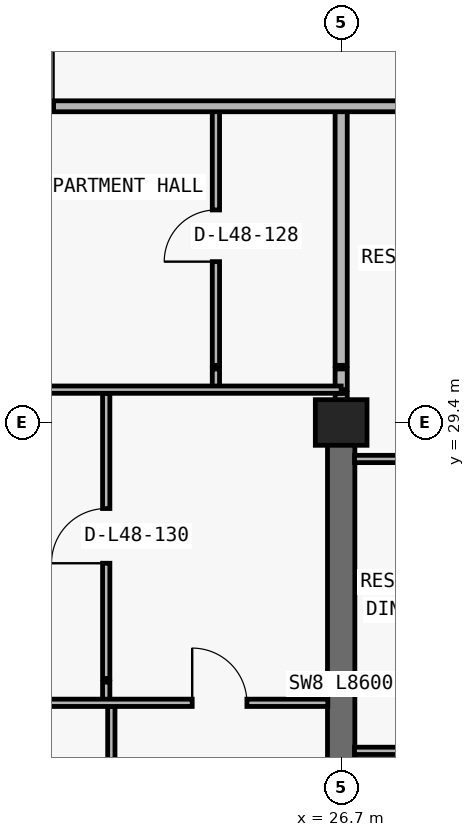
"""IFC4 building model, lengths in metres.
Left out: names, types, materials, properties, quantities, classifications, styles, units other than length and angle.
Written with IfcOpenShell. Run it as: python <this file> out.ifc"""

import sys

from ifc_helpers import new_model, si_unit, direction, frame, frame_2d, origin, origin_2d, place, context, subcontext, project, spatial, rectangle, extrude, element, fill, save


model = new_model("IFC4")
c1 = context("Model", 3, precision=1e-05, world=origin(), true_north=direction((0.0, 1.0)))
c2 = subcontext(c1, "Body", "Model", "MODEL_VIEW")
j1 = project(units=[si_unit("LENGTHUNIT", "METRE"), si_unit("PLANEANGLEUNIT", "RADIAN")], contexts=[c1])
p1 = place(None, origin())
s1 = spatial("IfcSite", under=j1, at=p1, CompositionType="ELEMENT")
p2 = place(p1, origin())
s2 = spatial("IfcBuilding", under=s1, at=p2, CompositionType="ELEMENT")
p3 = place(p2, frame((0.0, 0.0, 173.7)))
s3 = spatial("IfcBuildingStorey", under=s2, at=p3, CompositionType="ELEMENT", Elevation=173.7)
p4 = place(p3, frame((26.7, 29.4, 0.0), z_axis=(0.0, 0.0, 1.0), x_axis=(1.0, 0.0, 0.0)))
e1 = element("IfcColumn", 1, at=p4, inside=s3, PredefinedType="COLUMN", context=c2, shape_type="SweptSolid", body=[
    extrude(rectangle(XDim=0.85, YDim=0.75, at=origin_2d()), origin(), (0.0, 0.0, 1.0), 3.05),
])
p5 = place(p3, frame((26.7, 20.8, 0.0), z_axis=(0.0, 0.0, 1.0), x_axis=(0.0, 1.0, 0.0)))
e2 = element("IfcWall", 2, at=p5, inside=s3, PredefinedType="SHEAR", context=c2, shape_type="SweptSolid", body=[
    extrude(rectangle(XDim=8.6, YDim=0.45, at=frame_2d((4.3, 0.0))), origin(), (0.0, 0.0, 1.0), 3.05),
])
p6 = place(p3, frame((22.836, 24.79, 0.0), z_axis=(0.0, 0.0, 1.0), x_axis=(0.0, 1.0, 0.0)))
e3 = element("IfcWall", 3, at=p6, inside=s3, PredefinedType="PARTITIONING", context=c2, shape_type="SweptSolid", body=[
    extrude(rectangle(XDim=0.34, YDim=0.12, at=frame_2d((0.17, 0.0))), origin(), (0.0, 0.0, 1.0), 3.05),
])
p7 = place(p3, frame((22.836, 25.19, 0.0), z_axis=(0.0, 0.0, 1.0), x_axis=(0.0, 1.0, 0.0)))
e4 = element("IfcWall", 4, at=p7, inside=s3, PredefinedType="PARTITIONING", context=c2, shape_type="SweptSolid", body=[
    extrude(rectangle(XDim=4.69, YDim=0.12, at=frame_2d((2.345, 0.0))), origin(), (0.0, 0.0, 1.0), 3.05),
])
p8 = place(p7, frame((1.895, 0.0, 0.0)))
e5 = element("IfcOpeningElement", 5, at=p8, cuts=e4, PredefinedType="OPENING", context=c2, shape_type="SweptSolid", body=[
    extrude(rectangle(XDim=0.9, YDim=2.15, at=frame_2d((0.45, 1.075))), frame((0.0, 0.07, 0.0), z_axis=(0.0, -1.0, 0.0), x_axis=(1.0, 0.0, 0.0)), (0.0, 0.0, 1.0), 0.14),
])
p9 = place(p3, frame((22.92, 11.24, 0.0), z_axis=(0.0, 0.0, 1.0), x_axis=(0.0, 1.0, 0.0)))
e6 = element("IfcWall", 6, at=p9, inside=s3, PredefinedType="PARTITIONING", context=c2, shape_type="SweptSolid", body=[
    extrude(rectangle(XDim=13.49, YDim=0.12, at=frame_2d((6.745, 0.0))), origin(), (0.0, 0.0, 1.0), 3.05),
])
p10 = place(p3, frame((24.64, 29.94, 0.0), z_axis=(0.0, 0.0, 1.0), x_axis=(0.0, 1.0, 0.0)))
e7 = element("IfcWall", 7, at=p10, inside=s3, PredefinedType="PARTITIONING", context=c2, shape_type="SweptSolid", body=[
    extrude(rectangle(XDim=0.34, YDim=0.12, at=frame_2d((0.17, 0.0))), origin(), (0.0, 0.0, 1.0), 3.05),
])
p11 = place(p3, frame((24.64, 30.34, 0.0), z_axis=(0.0, 0.0, 1.0), x_axis=(0.0, 1.0, 0.0)))
e8 = element("IfcWall", 8, at=p11, inside=s3, PredefinedType="PARTITIONING", context=c2, shape_type="SweptSolid", body=[
    extrude(rectangle(XDim=4.26, YDim=0.12, at=frame_2d((2.13, 0.0))), origin(), (0.0, 0.0, 1.0), 3.05),
])
p12 = place(p11, frame((1.705, 0.0, 0.0)))
e9 = element("IfcOpeningElement", 9, at=p12, cuts=e8, PredefinedType="OPENING", context=c2, shape_type="SweptSolid", body=[
    extrude(rectangle(XDim=0.85, YDim=2.1, at=frame_2d((0.425, 1.05))), frame((0.0, 0.07, 0.0), z_axis=(0.0, -1.0, 0.0), x_axis=(1.0, 0.0, 0.0)), (0.0, 0.0, 1.0), 0.14),
])
p13 = place(p3, frame((26.7, 29.405, 0.0), z_axis=(0.0, 0.0, 1.0), x_axis=(0.0, 1.0, 0.0)))
e10 = element("IfcWall", 10, at=p13, inside=s3, PredefinedType="PARTITIONING", context=c2, shape_type="SweptSolid", body=[
    extrude(rectangle(XDim=0.475, YDim=0.2, at=frame_2d((0.237, 0.0))), origin(), (0.0, 0.0, 1.0), 2.335),
])
p14 = place(p3, frame((26.7, 29.94, 0.0), z_axis=(0.0, 0.0, 1.0), x_axis=(0.0, 1.0, 0.0)))
e11 = element("IfcWall", 11, at=p14, inside=s3, PredefinedType="PARTITIONING", context=c2, shape_type="SweptSolid", body=[
    extrude(rectangle(XDim=0.34, YDim=0.2, at=frame_2d((0.17, 0.0))), origin(), (0.0, 0.0, 1.0), 2.335),
])
p15 = place(p3, frame((26.7, 30.34, 0.0), z_axis=(0.0, 0.0, 1.0), x_axis=(0.0, 1.0, 0.0)))
e12 = element("IfcWall", 12, at=p15, inside=s3, PredefinedType="PARTITIONING", context=c2, shape_type="SweptSolid", body=[
    extrude(rectangle(XDim=4.26, YDim=0.2, at=frame_2d((2.13, 0.0))), origin(), (0.0, 0.0, 1.0), 2.335),
])
p16 = place(p3, frame((26.92, 24.0, 0.0), z_axis=(0.0, 0.0, 1.0), x_axis=(1.0, 0.0, 0.0)))
e13 = element("IfcWall", 13, at=p16, inside=s3, PredefinedType="PARTITIONING", context=c2, shape_type="SweptSolid", body=[
    extrude(rectangle(XDim=8.18, YDim=0.12, at=frame_2d((4.09, 0.0))), origin(), (0.0, 0.0, 1.0), 3.05),
])
p17 = place(p16, frame((1.33, 0.0, 0.0)))
e14 = element("IfcOpeningElement", 14, at=p17, cuts=e13, PredefinedType="OPENING", context=c2, shape_type="SweptSolid", body=[
    extrude(rectangle(XDim=0.9, YDim=2.15, at=frame_2d((0.45, 1.075))), frame((0.0, 0.07, 0.0), z_axis=(0.0, -1.0, 0.0), x_axis=(1.0, 0.0, 0.0)), (0.0, 0.0, 1.0), 0.14),
])
p18 = place(p3, frame((18.3, 24.79, 0.0), z_axis=(0.0, 0.0, 1.0), x_axis=(1.0, 0.0, 0.0)))
e15 = element("IfcWall", 15, at=p18, inside=s3, PredefinedType="PARTITIONING", context=c2, shape_type="SweptSolid", body=[
    extrude(rectangle(XDim=8.18, YDim=0.12, at=frame_2d((4.09, 0.0))), origin(), (0.0, 0.0, 1.0), 3.05),
])
p19 = place(p18, frame((1.818, 0.0, 0.0)))
e16 = element("IfcOpeningElement", 16, at=p19, cuts=e15, PredefinedType="OPENING", context=c2, shape_type="SweptSolid", body=[
    extrude(rectangle(XDim=0.9, YDim=2.15, at=frame_2d((0.45, 1.075))), frame((0.0, 0.07, 0.0), z_axis=(0.0, -1.0, 0.0), x_axis=(1.0, 0.0, 0.0)), (0.0, 0.0, 1.0), 0.14),
])
p20 = place(p18, frame((5.95, 0.0, 0.0)))
e17 = element("IfcOpeningElement", 17, at=p20, cuts=e15, PredefinedType="OPENING", context=c2, shape_type="SweptSolid", body=[
    extrude(rectangle(XDim=0.9, YDim=2.15, at=frame_2d((0.45, 1.075))), frame((0.0, 0.07, 0.0), z_axis=(0.0, -1.0, 0.0), x_axis=(1.0, 0.0, 0.0)), (0.0, 0.0, 1.0), 0.14),
])
p21 = place(p3, frame((26.92, 28.8, 0.0), z_axis=(0.0, 0.0, 1.0), x_axis=(1.0, 0.0, 0.0)))
e18 = element("IfcWall", 18, at=p21, inside=s3, PredefinedType="PARTITIONING", context=c2, shape_type="SweptSolid", body=[
    extrude(rectangle(XDim=8.175, YDim=0.12, at=frame_2d((4.087, 0.0))), origin(), (0.0, 0.0, 1.0), 3.05),
])
p22 = place(p21, frame((1.33, 0.0, 0.0)))
e19 = element("IfcOpeningElement", 19, at=p22, cuts=e18, PredefinedType="OPENING", context=c2, shape_type="SweptSolid", body=[
    extrude(rectangle(XDim=0.9, YDim=2.15, at=frame_2d((0.45, 1.075))), frame((0.0, 0.07, 0.0), z_axis=(0.0, -1.0, 0.0), x_axis=(1.0, 0.0, 0.0)), (0.0, 0.0, 1.0), 0.14),
])
p23 = place(p3, frame((18.3, 29.94, 0.0), z_axis=(0.0, 0.0, 1.0), x_axis=(1.0, 0.0, 0.0)))
e20 = element("IfcWall", 20, at=p23, inside=s3, PredefinedType="PARTITIONING", context=c2, shape_type="SweptSolid", body=[
    extrude(rectangle(XDim=8.4, YDim=0.12, at=frame_2d((4.2, 0.0))), origin(), (0.0, 0.0, 1.0), 3.05),
])
p24 = place(p23, frame((1.818, 0.0, 0.0)))
e21 = element("IfcOpeningElement", 21, at=p24, cuts=e20, PredefinedType="OPENING", context=c2, shape_type="SweptSolid", body=[
    extrude(rectangle(XDim=0.9, YDim=2.15, at=frame_2d((0.45, 1.075))), frame((0.0, 0.07, 0.0), z_axis=(0.0, -1.0, 0.0), x_axis=(1.0, 0.0, 0.0)), (0.0, 0.0, 1.0), 0.14),
])
p25 = place(p3, frame((18.3, 34.6, 0.0), z_axis=(0.0, 0.0, 1.0), x_axis=(1.0, 0.0, 0.0)))
e22 = element("IfcWall", 22, at=p25, inside=s3, PredefinedType="PARTITIONING", context=c2, shape_type="SweptSolid", body=[
    extrude(rectangle(XDim=41.2, YDim=0.18, at=frame_2d((20.6, 0.0))), origin(), (0.0, 0.0, 1.0), 3.05),
])
p26 = place(p25, frame((2.67, 0.0, 0.0)))
e23 = element("IfcOpeningElement", 23, at=p26, cuts=e22, PredefinedType="OPENING", context=c2, shape_type="SweptSolid", body=[
    extrude(rectangle(XDim=1.0, YDim=2.2, at=frame_2d((0.5, 1.1))), frame((0.0, 0.1, 0.0), z_axis=(0.0, -1.0, 0.0), x_axis=(1.0, 0.0, 0.0)), (0.0, 0.0, 1.0), 0.2),
])
p27 = place(p25, frame((11.212, 0.0, 0.0)))
e24 = element("IfcOpeningElement", 24, at=p27, cuts=e22, PredefinedType="OPENING", context=c2, shape_type="SweptSolid", body=[
    extrude(rectangle(XDim=1.0, YDim=2.2, at=frame_2d((0.5, 1.1))), frame((0.0, 0.1, 0.0), z_axis=(0.0, -1.0, 0.0), x_axis=(1.0, 0.0, 0.0)), (0.0, 0.0, 1.0), 0.2),
])
p28 = place(p25, frame((35.483, 0.0, 0.0)))
e25 = element("IfcOpeningElement", 25, at=p28, cuts=e22, PredefinedType="OPENING", context=c2, shape_type="SweptSolid", body=[
    extrude(rectangle(XDim=1.0, YDim=2.2, at=frame_2d((0.5, 1.1))), frame((0.0, 0.1, 0.0), z_axis=(0.0, -1.0, 0.0), x_axis=(1.0, 0.0, 0.0)), (0.0, 0.0, 1.0), 0.2),
])
p29 = place(p26, origin())
e26 = element("IfcDoor", 26, at=p29, inside=s3, OperationType="SINGLE_SWING_RIGHT", PredefinedType="DOOR", context=c2, shape_type="SweptSolid", body=[
    extrude(rectangle(XDim=1.0, YDim=2.2, at=frame_2d((0.5, 1.1))), frame((0.0, 0.025, 0.0), z_axis=(0.0, -1.0, 0.0), x_axis=(1.0, 0.0, 0.0)), (0.0, 0.0, 1.0), 0.05),
])
fill(e23, e26)
p30 = place(p12, origin())
e27 = element("IfcDoor", 27, at=p30, inside=s3, OperationType="SINGLE_SWING_LEFT", PredefinedType="DOOR", context=c2, shape_type="SweptSolid", body=[
    extrude(rectangle(XDim=0.85, YDim=2.1, at=frame_2d((0.425, 1.05))), frame((0.0, 0.025, 0.0), z_axis=(0.0, -1.0, 0.0), x_axis=(1.0, 0.0, 0.0)), (0.0, 0.0, 1.0), 0.05),
])
fill(e9, e27)
p31 = place(p8, origin())
e28 = element("IfcDoor", 28, at=p31, inside=s3, OperationType="SINGLE_SWING_LEFT", PredefinedType="DOOR", context=c2, shape_type="SweptSolid", body=[
    extrude(rectangle(XDim=0.9, YDim=2.15, at=frame_2d((0.45, 1.075))), frame((0.0, 0.025, 0.0), z_axis=(0.0, -1.0, 0.0), x_axis=(1.0, 0.0, 0.0)), (0.0, 0.0, 1.0), 0.05),
])
fill(e5, e28)
p32 = place(p20, origin())
e29 = element("IfcDoor", 29, at=p32, inside=s3, OperationType="SINGLE_SWING_LEFT", PredefinedType="DOOR", context=c2, shape_type="SweptSolid", body=[
    extrude(rectangle(XDim=0.9, YDim=2.15, at=frame_2d((0.45, 1.075))), frame((0.0, 0.025, 0.0), z_axis=(0.0, -1.0, 0.0), x_axis=(1.0, 0.0, 0.0)), (0.0, 0.0, 1.0), 0.05),
])
fill(e17, e29)
save(model, sys.argv[1])
